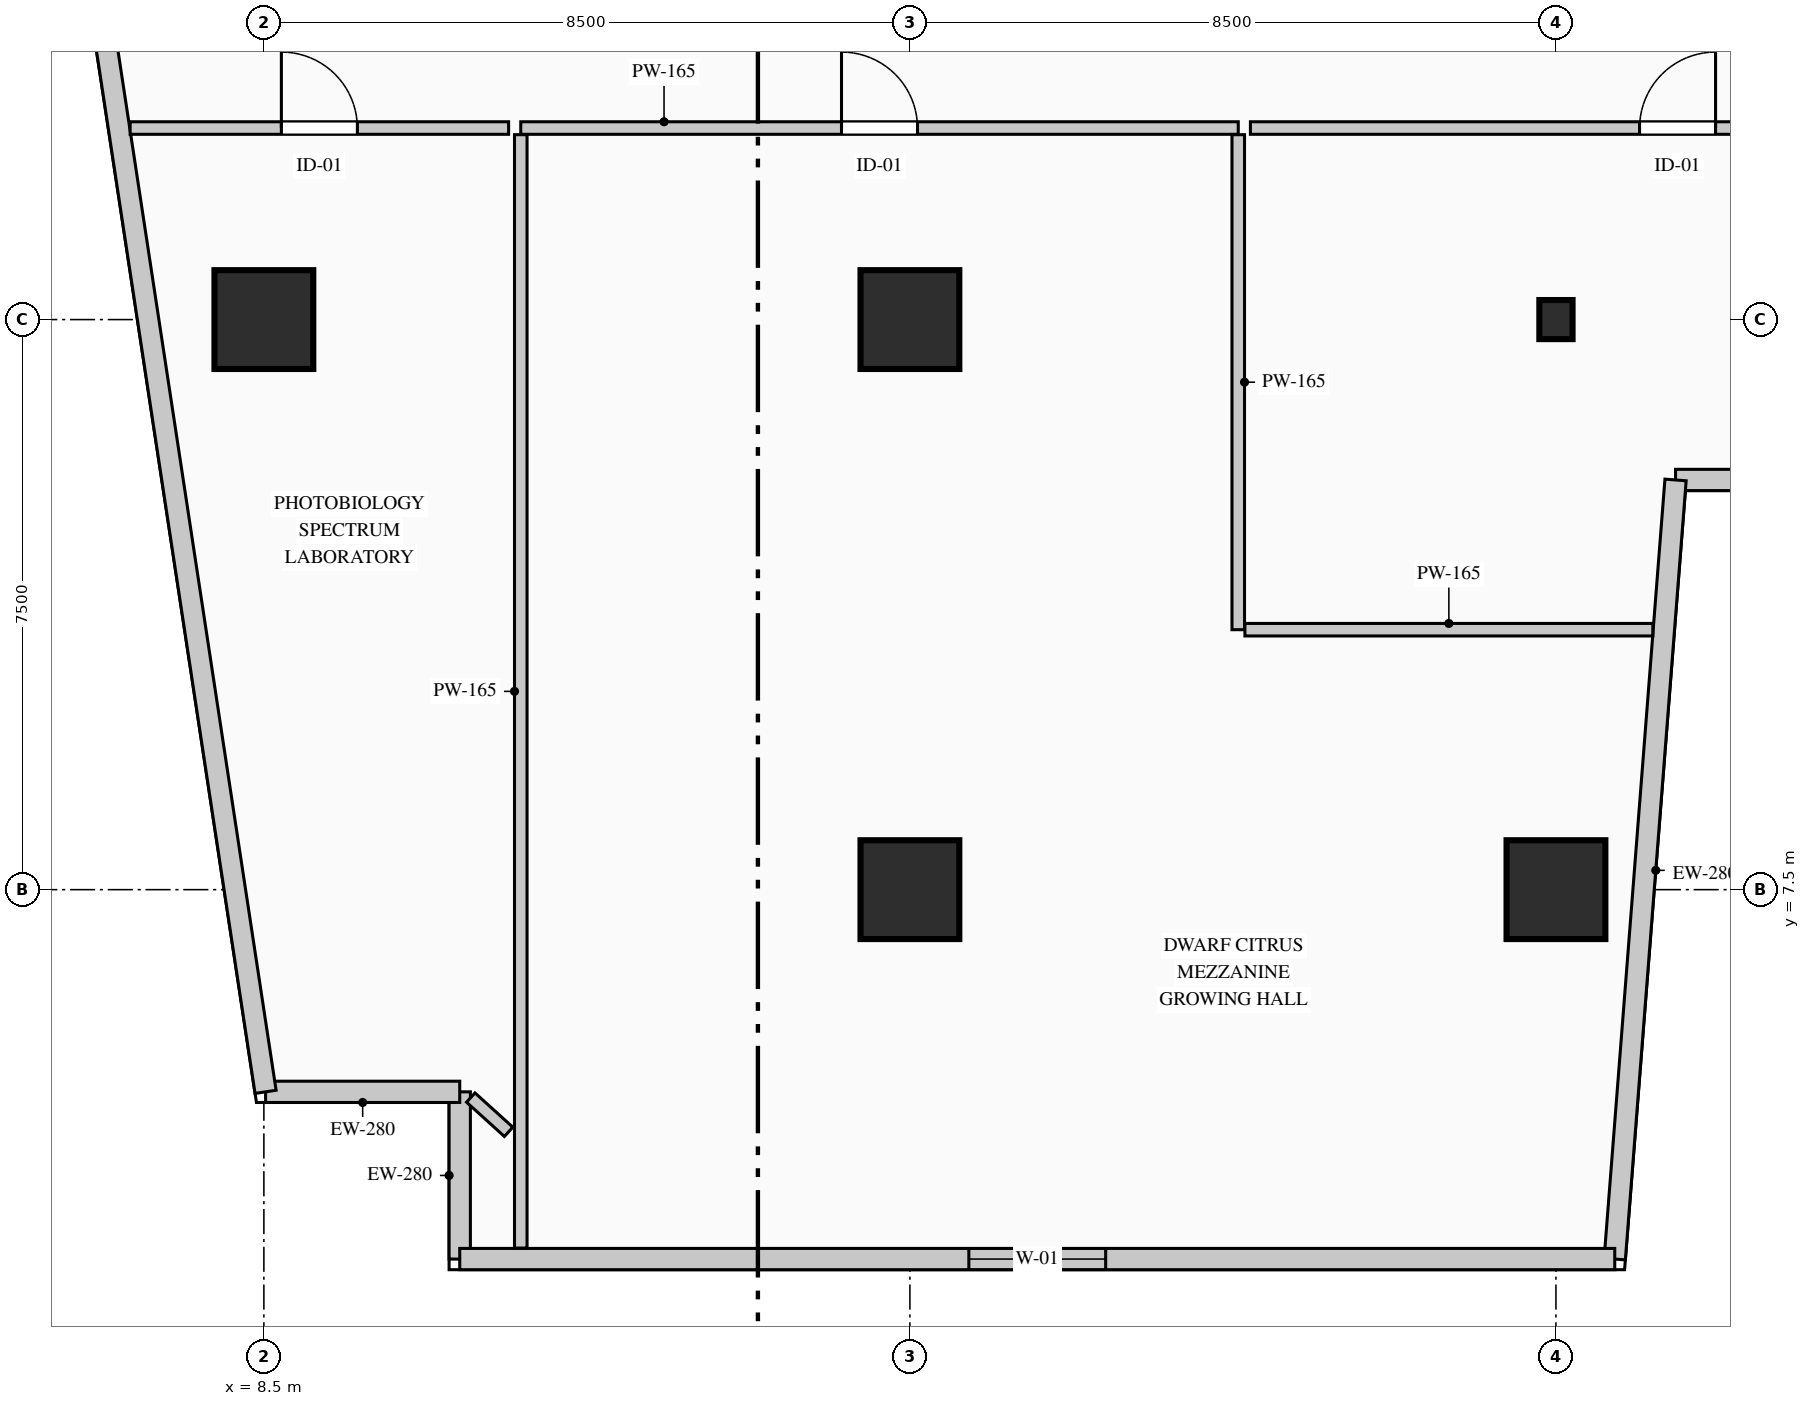
"""IFC4 building model, lengths in metres.
Left out: names, types, materials, properties, quantities, classifications, styles, units other than length and angle.
Written with IfcOpenShell. Run it as: python <this file> out.ifc"""

import sys

from ifc_helpers import new_model, si_unit, direction, frame, frame_2d, origin, origin_2d, place, context, subcontext, project, spatial, rectangle, i_section, extrude, element, fill, save


model = new_model("IFC4")
c1 = context("Model", 3, precision=1e-05, world=origin(), true_north=direction((0.0, 1.0)))
c2 = subcontext(c1, "Body", "Model", "MODEL_VIEW")
j1 = project(units=[si_unit("LENGTHUNIT", "METRE"), si_unit("PLANEANGLEUNIT", "RADIAN")], contexts=[c1])
p1 = place(None, origin())
s1 = spatial("IfcSite", under=j1, at=p1, CompositionType="ELEMENT")
p2 = place(p1, origin())
s2 = spatial("IfcBuilding", under=s1, at=p2, CompositionType="ELEMENT")
p3 = place(p2, frame((0.0, 0.0, 71.0)))
s3 = spatial("IfcBuildingStorey", under=s2, at=p3, CompositionType="ELEMENT", Elevation=71.0)
for number, where, z_axis, x_axis in (
    (1, (8.5, 15.0, 0.0), (0.0, 0.0, 1.0), (1.0, 0.0, 0.0)),
    (2, (17.0, 7.5, 0.0), (0.0, 0.0, 1.0), (1.0, 0.0, 0.0)),
    (3, (17.0, 15.0, 0.0), (0.0, 0.0, 1.0), (1.0, 0.0, 0.0)),
    (4, (25.5, 7.5, 0.0), (0.0, 0.0, 1.0), (1.0, 0.0, 0.0)),
):
    element("IfcColumn", number, at=place(p3, frame(where, z_axis=z_axis, x_axis=x_axis)), inside=s3, PredefinedType="COLUMN", context=c2, shape_type="SweptSolid", body=[
        extrude(rectangle(XDim=1.3, YDim=1.3, at=origin_2d()), origin(), (0.0, 0.0, 1.0), 4.4),
    ])
p4 = place(p3, frame((25.5, 15.0, 0.0), z_axis=(0.0, 0.0, 1.0), x_axis=(1.0, 0.0, 0.0)))
e5 = element("IfcColumn", 5, at=p4, inside=s3, PredefinedType="COLUMN", context=c2, shape_type="SweptSolid", body=[
    extrude(i_section(OverallWidth=0.437, OverallDepth=0.514, WebThickness=0.061, FlangeThickness=0.077, FilletRadius=0.015, at=origin_2d()), origin(), (0.0, 0.0, 1.0), 4.4),
])
p5 = place(p3, frame((11.077, 2.64, 0.0), z_axis=(0.0, 0.0, 1.0), x_axis=(0.0, 1.0, 0.0)))
e6 = element("IfcWall", 6, at=p5, inside=s3, PredefinedType="STANDARD", context=c2, shape_type="SweptSolid", body=[
    extrude(rectangle(XDim=2.2, YDim=0.28, at=frame_2d((1.1, 0.0))), origin(), (0.0, 0.0, 1.0), 4.1),
])
p6 = place(p3, frame((11.077, 4.84, 0.0), z_axis=(0.0, 0.0, 1.0), x_axis=(-1.0, 0.0, 0.0)))
e7 = element("IfcWall", 7, at=p6, inside=s3, PredefinedType="STANDARD", context=c2, shape_type="SweptSolid", body=[
    extrude(rectangle(XDim=2.554, YDim=0.28, at=frame_2d((1.277, 0.0))), origin(), (0.0, 0.0, 1.0), 4.1),
])
p7 = place(p3, frame((8.523, 4.84, 0.0), z_axis=(0.0, 0.0, 1.0), x_axis=(-0.150394554312, 0.988626055712, 0.0)))
e8 = element("IfcWall", 8, at=p7, inside=s3, PredefinedType="STANDARD", context=c2, shape_type="SweptSolid", body=[
    extrude(rectangle(XDim=36.738, YDim=0.28, at=frame_2d((18.369, 0.0))), origin(), (0.0, 0.0, 1.0), 4.1),
])
p8 = place(p7, frame((22.612, 0.0, 0.9)))
e9 = element("IfcOpeningElement", 9, at=p8, cuts=e8, PredefinedType="OPENING", context=c2, shape_type="SweptSolid", body=[
    extrude(rectangle(XDim=1.8, YDim=2.1, at=frame_2d((0.9, 1.05))), frame((0.0, 0.15, 0.0), z_axis=(0.0, -1.0, 0.0), x_axis=(1.0, 0.0, 0.0)), (0.0, 0.0, 1.0), 0.3),
])
p9 = place(p3, frame((35.77, 12.89, 0.0), z_axis=(0.0, 0.0, 1.0), x_axis=(-1.0, 0.0, 0.0)))
e10 = element("IfcWall", 10, at=p9, inside=s3, PredefinedType="STANDARD", context=c2, shape_type="SweptSolid", body=[
    extrude(rectangle(XDim=8.697, YDim=0.28, at=frame_2d((4.348, 0.0))), origin(), (0.0, 0.0, 1.0), 4.1),
])
p10 = place(p9, frame((4.666, 0.0, 0.9)))
e11 = element("IfcOpeningElement", 11, at=p10, cuts=e10, PredefinedType="OPENING", context=c2, shape_type="SweptSolid", body=[
    extrude(rectangle(XDim=1.8, YDim=2.1, at=frame_2d((0.9, 1.05))), frame((0.0, 0.15, 0.0), z_axis=(0.0, -1.0, 0.0), x_axis=(1.0, 0.0, 0.0)), (0.0, 0.0, 1.0), 0.3),
])
p11 = place(p3, frame((27.073, 12.89, 0.0), z_axis=(0.0, 0.0, 1.0), x_axis=(-0.077816860153, -0.996967670627, 0.0)))
e12 = element("IfcWall", 12, at=p11, inside=s3, PredefinedType="STANDARD", context=c2, shape_type="SweptSolid", body=[
    extrude(rectangle(XDim=10.281, YDim=0.28, at=frame_2d((5.141, 0.0))), origin(), (0.0, 0.0, 1.0), 4.1),
])
p12 = place(p3, frame((26.273, 2.64, 0.0), z_axis=(0.0, 0.0, 1.0), x_axis=(-1.0, 0.0, 0.0)))
e13 = element("IfcWall", 13, at=p12, inside=s3, PredefinedType="STANDARD", context=c2, shape_type="SweptSolid", body=[
    extrude(rectangle(XDim=15.197, YDim=0.28, at=frame_2d((7.598, 0.0))), origin(), (0.0, 0.0, 1.0), 4.1),
])
p13 = place(p12, frame((6.698, 0.0, 0.9)))
e14 = element("IfcOpeningElement", 14, at=p13, cuts=e13, PredefinedType="OPENING", context=c2, shape_type="SweptSolid", body=[
    extrude(rectangle(XDim=1.8, YDim=2.1, at=frame_2d((0.9, 1.05))), frame((0.0, 0.15, 0.0), z_axis=(0.0, -1.0, 0.0), x_axis=(1.0, 0.0, 0.0)), (0.0, 0.0, 1.0), 0.3),
])
p14 = place(p3, frame((11.88, 17.52, 0.0), z_axis=(0.0, 0.0, 1.0), x_axis=(1.0, 0.0, 0.0)))
e15 = element("IfcWall", 15, at=p14, inside=s3, PredefinedType="PARTITIONING", context=c2, shape_type="SweptSolid", body=[
    extrude(rectangle(XDim=9.44, YDim=0.165, at=frame_2d((4.72, 0.0))), origin(), (0.0, 0.0, 1.0), 4.1),
])
p15 = place(p14, frame((4.22, 0.0, 0.0)))
e16 = element("IfcOpeningElement", 16, at=p15, cuts=e15, PredefinedType="OPENING", context=c2, shape_type="SweptSolid", body=[
    extrude(rectangle(XDim=1.0, YDim=2.15, at=frame_2d((0.5, 1.075))), frame((0.0, 0.093, 0.0), z_axis=(0.0, -1.0, 0.0), x_axis=(1.0, 0.0, 0.0)), (0.0, 0.0, 1.0), 0.185),
])
p16 = place(p3, frame((21.32, 17.433, 0.0), z_axis=(0.0, 0.0, 1.0), x_axis=(0.0, -1.0, 0.0)))
e17 = element("IfcWall", 17, at=p16, inside=s3, PredefinedType="PARTITIONING", context=c2, shape_type="SweptSolid", body=[
    extrude(rectangle(XDim=6.513, YDim=0.165, at=frame_2d((3.256, 0.0))), origin(), (0.0, 0.0, 1.0), 3.725),
])
p17 = place(p3, frame((21.407, 10.92, 0.0), z_axis=(0.0, 0.0, 1.0), x_axis=(1.0, 0.0, 0.0)))
e18 = element("IfcWall", 18, at=p17, inside=s3, PredefinedType="PARTITIONING", context=c2, shape_type="SweptSolid", body=[
    extrude(rectangle(XDim=5.367, YDim=0.165, at=frame_2d((2.684, 0.0))), origin(), (0.0, 0.0, 1.0), 4.1),
])
p18 = place(p3, frame((11.88, 2.785, 0.0), z_axis=(0.0, 0.0, 1.0), x_axis=(0.0, 1.0, 0.0)))
e19 = element("IfcWall", 19, at=p18, inside=s3, PredefinedType="PARTITIONING", context=c2, shape_type="SweptSolid", body=[
    extrude(rectangle(XDim=14.648, YDim=0.165, at=frame_2d((7.324, 0.0))), origin(), (0.0, 0.0, 1.0), 4.1),
])
p19 = place(p3, frame((11.72, 4.314, 0.0), z_axis=(0.0, 0.0, 1.0), x_axis=(-0.741303295748, 0.671170189827, 0.0)))
e20 = element("IfcWall", 20, at=p19, inside=s3, PredefinedType="PARTITIONING", context=c2, shape_type="SweptSolid", body=[
    extrude(rectangle(XDim=0.672, YDim=0.165, at=frame_2d((0.336, 0.0))), origin(), (0.0, 0.0, 1.0), 4.1),
])
p20 = place(p3, frame((6.74, 17.52, 0.0), z_axis=(0.0, 0.0, 1.0), x_axis=(1.0, 0.0, 0.0)))
e21 = element("IfcWall", 21, at=p20, inside=s3, PredefinedType="PARTITIONING", context=c2, shape_type="SweptSolid", body=[
    extrude(rectangle(XDim=4.979, YDim=0.165, at=frame_2d((2.49, 0.0))), origin(), (0.0, 0.0, 1.0), 4.1),
])
p21 = place(p20, frame((1.99, 0.0, 0.0)))
e22 = element("IfcOpeningElement", 22, at=p21, cuts=e21, PredefinedType="OPENING", context=c2, shape_type="SweptSolid", body=[
    extrude(rectangle(XDim=1.0, YDim=2.15, at=frame_2d((0.5, 1.075))), frame((0.0, 0.093, 0.0), z_axis=(0.0, -1.0, 0.0), x_axis=(1.0, 0.0, 0.0)), (0.0, 0.0, 1.0), 0.185),
])
p22 = place(p3, frame((21.48, 17.52, 0.0), z_axis=(0.0, 0.0, 1.0), x_axis=(1.0, 0.0, 0.0)))
e23 = element("IfcWall", 23, at=p22, inside=s3, PredefinedType="PARTITIONING", context=c2, shape_type="SweptSolid", body=[
    extrude(rectangle(XDim=11.24, YDim=0.165, at=frame_2d((5.62, 0.0))), origin(), (0.0, 0.0, 1.0), 3.885),
])
p23 = place(p22, frame((5.12, 0.0, 0.0)))
e24 = element("IfcOpeningElement", 24, at=p23, cuts=e23, PredefinedType="OPENING", context=c2, shape_type="SweptSolid", body=[
    extrude(rectangle(XDim=1.0, YDim=2.15, at=frame_2d((0.5, 1.075))), frame((0.0, 0.093, 0.0), z_axis=(0.0, -1.0, 0.0), x_axis=(1.0, 0.0, 0.0)), (0.0, 0.0, 1.0), 0.185),
])
p24 = place(p13, origin())
e25 = element("IfcWindow", 25, at=p24, inside=s3, PartitioningType="SINGLE_PANEL", PredefinedType="WINDOW", context=c2, shape_type="SweptSolid", body=[
    extrude(rectangle(XDim=1.8, YDim=2.1, at=frame_2d((0.9, 1.05))), frame((0.0, 0.03, 0.0), z_axis=(0.0, -1.0, 0.0), x_axis=(1.0, 0.0, 0.0)), (0.0, 0.0, 1.0), 0.06),
])
fill(e14, e25)
p25 = place(p15, origin())
e26 = element("IfcDoor", 26, at=p25, inside=s3, OperationType="SINGLE_SWING_LEFT", PredefinedType="DOOR", context=c2, shape_type="SweptSolid", body=[
    extrude(rectangle(XDim=1.0, YDim=2.15, at=frame_2d((0.5, 1.075))), frame((0.0, 0.025, 0.0), z_axis=(0.0, -1.0, 0.0), x_axis=(1.0, 0.0, 0.0)), (0.0, 0.0, 1.0), 0.05),
])
fill(e16, e26)
p26 = place(p21, origin())
e27 = element("IfcDoor", 27, at=p26, inside=s3, OperationType="SINGLE_SWING_LEFT", PredefinedType="DOOR", context=c2, shape_type="SweptSolid", body=[
    extrude(rectangle(XDim=1.0, YDim=2.15, at=frame_2d((0.5, 1.075))), frame((0.0, 0.025, 0.0), z_axis=(0.0, -1.0, 0.0), x_axis=(1.0, 0.0, 0.0)), (0.0, 0.0, 1.0), 0.05),
])
fill(e22, e27)
p27 = place(p23, origin())
e28 = element("IfcDoor", 28, at=p27, inside=s3, OperationType="SINGLE_SWING_RIGHT", PredefinedType="DOOR", context=c2, shape_type="SweptSolid", body=[
    extrude(rectangle(XDim=1.0, YDim=2.15, at=frame_2d((0.5, 1.075))), frame((0.0, 0.025, 0.0), z_axis=(0.0, -1.0, 0.0), x_axis=(1.0, 0.0, 0.0)), (0.0, 0.0, 1.0), 0.05),
])
fill(e24, e28)
save(model, sys.argv[1])
